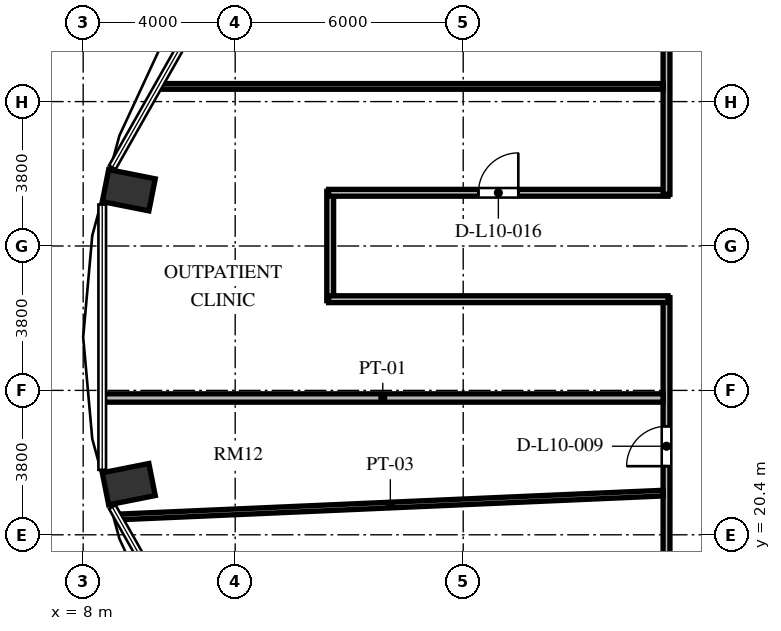
"""IFC4 building model, lengths in metres.
Left out: names, types, materials, properties, quantities, classifications, styles, units other than length and angle.
Written with IfcOpenShell. Run it as: python <this file> out.ifc"""

import sys

from ifc_helpers import new_model, si_unit, direction, frame, frame_2d, origin, origin_2d, place, context, subcontext, project, spatial, rectangle, extrude, element, fill, save


model = new_model("IFC4")
c1 = context("Model", 3, precision=1e-05, world=origin(), true_north=direction((0.0, 1.0)))
c2 = subcontext(c1, "Body", "Model", "MODEL_VIEW")
j1 = project(units=[si_unit("LENGTHUNIT", "METRE"), si_unit("PLANEANGLEUNIT", "RADIAN")], contexts=[c1])
p1 = place(None, origin())
s1 = spatial("IfcSite", under=j1, at=p1, CompositionType="ELEMENT")
p2 = place(p1, origin())
s2 = spatial("IfcBuilding", under=s1, at=p2, CompositionType="ELEMENT")
p3 = place(p2, frame((0.0, 0.0, 43.44)))
s3 = spatial("IfcBuildingStorey", under=s2, at=p3, CompositionType="ELEMENT", Elevation=43.44)
for number, where, z_axis, x_axis in (
    (1, (9.2, 29.468, 0.0), (0.0, 0.0, 1.0), (-0.981, 0.195, 0.0)),
    (2, (9.2, 21.732, 0.0), (0.0, 0.0, 1.0), (-0.981, -0.195, 0.0)),
):
    element("IfcColumn", number, at=place(p3, frame(where, z_axis=z_axis, x_axis=x_axis)), inside=s3, PredefinedType="COLUMN", context=c2, shape_type="SweptSolid", body=[
        extrude(rectangle(XDim=1.25, YDim=0.86, at=origin_2d()), origin(), (0.0, 0.0, 1.0), 3.648),
    ])
p4 = place(p3, frame((14.5, 26.56, 0.0), z_axis=(0.0, 0.0, 1.0), x_axis=(0.0, 1.0, 0.0)))
e3 = element("IfcWall", 3, at=p4, inside=s3, PredefinedType="PARTITIONING", context=c2, shape_type="SweptSolid", body=[
    extrude(rectangle(XDim=2.88, YDim=0.18, at=frame_2d((1.44, 0.0))), origin(), (0.0, 0.0, 1.0), 3.428),
])
p5 = place(p3, frame((14.46, 29.4, 0.0), z_axis=(0.0, 0.0, 1.0), x_axis=(1.0, 0.0, 0.0)))
e4 = element("IfcWall", 4, at=p5, inside=s3, PredefinedType="PARTITIONING", context=c2, shape_type="SweptSolid", body=[
    extrude(rectangle(XDim=8.93, YDim=0.18, at=frame_2d((4.465, 0.0))), origin(), (0.0, 0.0, 1.0), 3.428),
])
p6 = place(p5, frame((3.94, 0.0, 0.0)))
e5 = element("IfcOpeningElement", 5, at=p6, cuts=e4, PredefinedType="OPENING", context=c2, shape_type="SweptSolid", body=[
    extrude(rectangle(XDim=1.05, YDim=2.15, at=frame_2d((0.525, 1.075))), frame((0.0, 0.1, 0.0), z_axis=(0.0, -1.0, 0.0), x_axis=(1.0, 0.0, 0.0)), (0.0, 0.0, 1.0), 0.2),
])
p7 = place(p3, frame((23.35, 29.36, 0.0), z_axis=(0.0, 0.0, 1.0), x_axis=(0.0, 1.0, 0.0)))
e6 = element("IfcWall", 6, at=p7, inside=s3, PredefinedType="PARTITIONING", context=c2, shape_type="SweptSolid", body=[
    extrude(rectangle(XDim=9.43, YDim=0.18, at=frame_2d((4.715, 0.0))), origin(), (0.0, 0.0, 1.0), 3.428),
])
p8 = place(p7, frame((3.815, 0.0, 0.0)))
e7 = element("IfcOpeningElement", 7, at=p8, cuts=e6, PredefinedType="OPENING", context=c2, shape_type="SweptSolid", body=[
    extrude(rectangle(XDim=1.05, YDim=2.15, at=frame_2d((0.525, 1.075))), frame((0.0, 0.1, 0.0), z_axis=(0.0, -1.0, 0.0), x_axis=(1.0, 0.0, 0.0)), (0.0, 0.0, 1.0), 0.2),
])
p9 = place(p3, frame((23.35, 17.36, 0.0), z_axis=(0.0, 0.0, 1.0), x_axis=(0.0, 1.0, 0.0)))
e8 = element("IfcWall", 8, at=p9, inside=s3, PredefinedType="PARTITIONING", context=c2, shape_type="SweptSolid", body=[
    extrude(rectangle(XDim=9.28, YDim=0.18, at=frame_2d((4.64, 0.0))), origin(), (0.0, 0.0, 1.0), 3.428),
])
p10 = place(p9, frame((4.846, 0.0, 0.0)))
e9 = element("IfcOpeningElement", 9, at=p10, cuts=e8, PredefinedType="OPENING", context=c2, shape_type="SweptSolid", body=[
    extrude(rectangle(XDim=1.05, YDim=2.15, at=frame_2d((0.525, 1.075))), frame((0.0, 0.1, 0.0), z_axis=(0.0, -1.0, 0.0), x_axis=(1.0, 0.0, 0.0)), (0.0, 0.0, 1.0), 0.2),
])
p11 = place(p3, frame((23.39, 26.6, 0.0), z_axis=(0.0, 0.0, 1.0), x_axis=(-1.0, 0.0, 0.0)))
e10 = element("IfcWall", 10, at=p11, inside=s3, PredefinedType="PARTITIONING", context=c2, shape_type="SweptSolid", body=[
    extrude(rectangle(XDim=8.93, YDim=0.18, at=frame_2d((4.465, 0.0))), origin(), (0.0, 0.0, 1.0), 3.428),
])
p12 = place(p3, frame((8.905, 20.868, 0.0), z_axis=(0.0, 0.0, 1.0), x_axis=(0.999043936959, 0.043717411007, 0.0)))
e11 = element("IfcWall", 11, at=p12, inside=s3, PredefinedType="PARTITIONING", context=c2, shape_type="SweptSolid", body=[
    extrude(rectangle(XDim=14.369, YDim=0.15, at=frame_2d((7.185, 0.0))), origin(), (0.0, 0.0, 1.0), 2.813),
])
p13 = place(p3, frame((8.508, 24.0, 0.0), z_axis=(0.0, 0.0, 1.0), x_axis=(1.0, 0.0, 0.0)))
e12 = element("IfcWall", 12, at=p13, inside=s3, PredefinedType="PARTITIONING", context=c2, shape_type="SweptSolid", body=[
    extrude(rectangle(XDim=14.752, YDim=0.22, at=frame_2d((7.376, 0.0))), origin(), (0.0, 0.0, 1.0), 3.428),
])
p14 = place(p3, frame((9.978, 32.2, 0.0), z_axis=(0.0, 0.0, 1.0), x_axis=(1.0, 0.0, 0.0)))
e13 = element("IfcWall", 13, at=p14, inside=s3, PredefinedType="PARTITIONING", context=c2, shape_type="SweptSolid", body=[
    extrude(rectangle(XDim=13.282, YDim=0.15, at=frame_2d((6.641, 0.0))), origin(), (0.0, 0.0, 1.0), 3.428),
])
p15 = place(p10, origin())
e14 = element("IfcDoor", 14, at=p15, inside=s3, OperationType="SINGLE_SWING_LEFT", PredefinedType="DOOR", context=c2, shape_type="SweptSolid", body=[
    extrude(rectangle(XDim=1.05, YDim=2.15, at=frame_2d((0.525, 1.075))), frame((0.0, 0.025, 0.0), z_axis=(0.0, -1.0, 0.0), x_axis=(1.0, 0.0, 0.0)), (0.0, 0.0, 1.0), 0.05),
])
fill(e9, e14)
p16 = place(p6, origin())
e15 = element("IfcDoor", 15, at=p16, inside=s3, OperationType="SINGLE_SWING_RIGHT", PredefinedType="DOOR", context=c2, shape_type="SweptSolid", body=[
    extrude(rectangle(XDim=1.05, YDim=2.15, at=frame_2d((0.525, 1.075))), frame((0.0, 0.025, 0.0), z_axis=(0.0, -1.0, 0.0), x_axis=(1.0, 0.0, 0.0)), (0.0, 0.0, 1.0), 0.05),
])
fill(e5, e15)
save(model, sys.argv[1])
